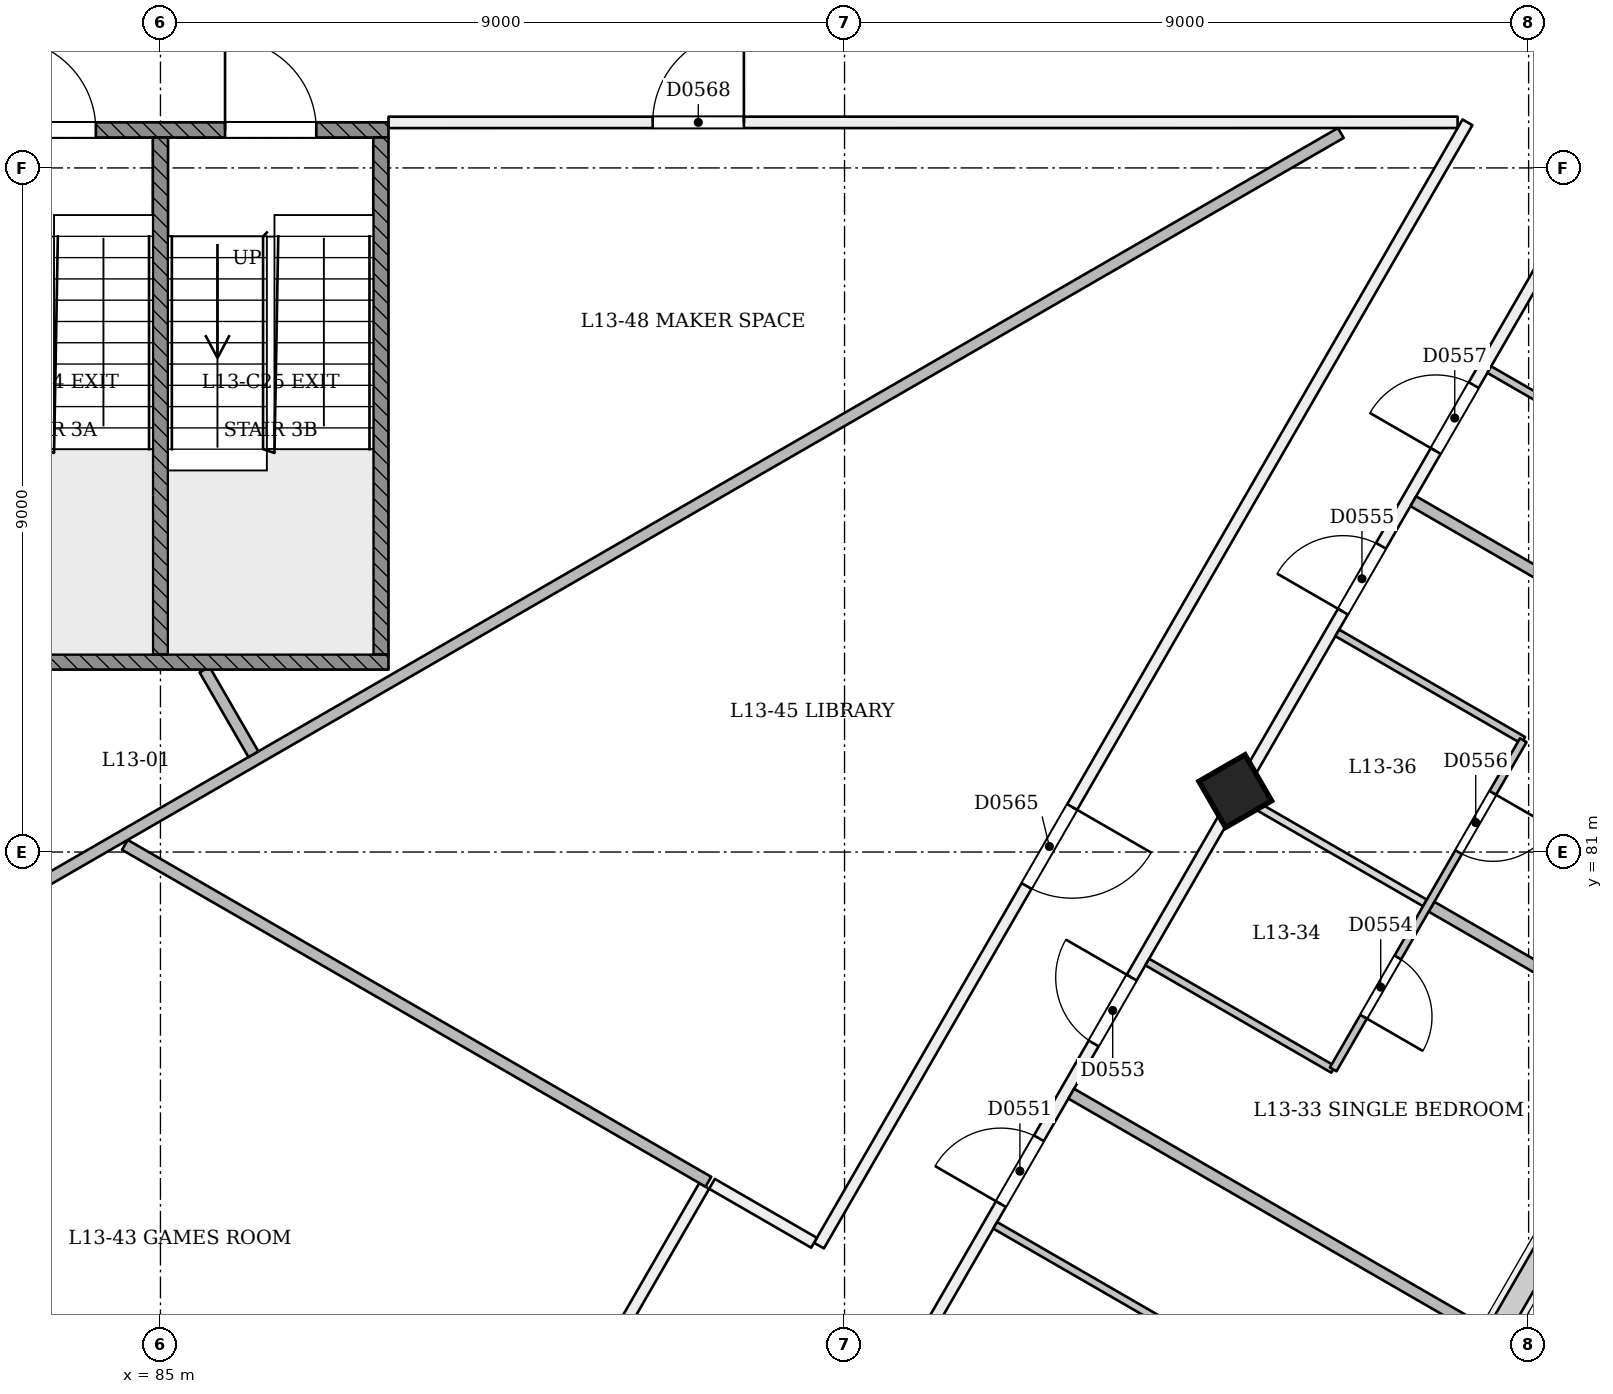
"""IFC4 building model, lengths in metres.
Left out: names, types, materials, properties, quantities, classifications, styles, units other than length and angle.
Written with IfcOpenShell. Run it as: python <this file> out.ifc"""

import sys

from ifc_helpers import new_model, si_unit, direction, frame, frame_2d, origin, origin_2d, place, context, subcontext, project, spatial, rectangle, extrude, element, fill, save


model = new_model("IFC4")
c1 = context("Model", 3, precision=1e-05, world=origin(), true_north=direction((0.0, 1.0)))
c2 = subcontext(c1, "Body", "Model", "MODEL_VIEW")
j1 = project(units=[si_unit("LENGTHUNIT", "METRE"), si_unit("PLANEANGLEUNIT", "RADIAN")], contexts=[c1])
p1 = place(None, origin())
s1 = spatial("IfcSite", under=j1, at=p1, CompositionType="ELEMENT")
p2 = place(p1, origin())
s2 = spatial("IfcBuilding", under=s1, at=p2, CompositionType="ELEMENT")
p3 = place(p2, frame((0.0, 0.0, 55.8)))
s3 = spatial("IfcBuildingStorey", under=s2, at=p3, CompositionType="ELEMENT", Elevation=55.8)
p4 = place(p3, frame((99.168, 81.755, -0.021), z_axis=(-0.022222852987, 0.038483477124, 0.999012095419), x_axis=(-0.500169973044, -0.865642122652, 0.022219665955)))
e1 = element("IfcColumn", 1, at=p4, inside=s3, PredefinedType="COLUMN", context=c2, shape_type="SweptSolid", body=[
    extrude(rectangle(XDim=0.7, YDim=0.7, at=origin_2d()), origin(), (0.0, 0.0, 1.0), 3.604),
])
p5 = place(p3, frame((85.99, 58.932, 0.0), z_axis=(0.0, 0.0, 1.0), x_axis=(0.500001547762, 0.866024510182, 0.0)))
e2 = element("IfcWall", 2, at=p5, inside=s3, PredefinedType="PARTITIONING", context=c2, shape_type="SweptSolid", body=[
    extrude(rectangle(XDim=42.454, YDim=0.15, at=frame_2d((21.227, 0.0))), origin(), (0.0, 0.0, 1.0), 2.7),
])
p6 = place(p5, frame((3.577, 0.0, 0.0)))
e3 = element("IfcOpeningElement", 3, at=p6, cuts=e2, PredefinedType="OPENING", context=c2, shape_type="SweptSolid", body=[
    extrude(rectangle(XDim=1.2, YDim=2.1, at=frame_2d((0.6, 1.05))), frame((0.0, 0.085, 0.0), z_axis=(0.0, -1.0, 0.0), x_axis=(1.0, 0.0, 0.0)), (0.0, 0.0, 1.0), 0.171),
])
p7 = place(p5, frame((11.134, 0.0, 0.0)))
e4 = element("IfcOpeningElement", 4, at=p7, cuts=e2, PredefinedType="OPENING", context=c2, shape_type="SweptSolid", body=[
    extrude(rectangle(XDim=1.0, YDim=2.1, at=frame_2d((0.5, 1.05))), frame((0.0, 0.085, 0.0), z_axis=(0.0, -1.0, 0.0), x_axis=(1.0, 0.0, 0.0)), (0.0, 0.0, 1.0), 0.171),
])
p8 = place(p5, frame((13.575, 0.0, 0.0)))
e5 = element("IfcOpeningElement", 5, at=p8, cuts=e2, PredefinedType="OPENING", context=c2, shape_type="SweptSolid", body=[
    extrude(rectangle(XDim=1.0, YDim=2.1, at=frame_2d((0.5, 1.05))), frame((0.0, 0.085, 0.0), z_axis=(0.0, -1.0, 0.0), x_axis=(1.0, 0.0, 0.0)), (0.0, 0.0, 1.0), 0.171),
])
p9 = place(p5, frame((20.134, 0.0, 0.0)))
e6 = element("IfcOpeningElement", 6, at=p9, cuts=e2, PredefinedType="OPENING", context=c2, shape_type="SweptSolid", body=[
    extrude(rectangle(XDim=1.0, YDim=2.1, at=frame_2d((0.5, 1.05))), frame((0.0, 0.085, 0.0), z_axis=(0.0, -1.0, 0.0), x_axis=(1.0, 0.0, 0.0)), (0.0, 0.0, 1.0), 0.171),
])
p10 = place(p5, frame((22.575, 0.0, 0.0)))
e7 = element("IfcOpeningElement", 7, at=p10, cuts=e2, PredefinedType="OPENING", context=c2, shape_type="SweptSolid", body=[
    extrude(rectangle(XDim=1.0, YDim=2.1, at=frame_2d((0.5, 1.05))), frame((0.0, 0.085, 0.0), z_axis=(0.0, -1.0, 0.0), x_axis=(1.0, 0.0, 0.0)), (0.0, 0.0, 1.0), 0.171),
])
p11 = place(p5, frame((29.134, 0.0, 0.0)))
e8 = element("IfcOpeningElement", 8, at=p11, cuts=e2, PredefinedType="OPENING", context=c2, shape_type="SweptSolid", body=[
    extrude(rectangle(XDim=1.0, YDim=2.1, at=frame_2d((0.5, 1.05))), frame((0.0, 0.085, 0.0), z_axis=(0.0, -1.0, 0.0), x_axis=(1.0, 0.0, 0.0)), (0.0, 0.0, 1.0), 0.171),
])
p12 = place(p5, frame((31.575, 0.0, 0.0)))
e9 = element("IfcOpeningElement", 9, at=p12, cuts=e2, PredefinedType="OPENING", context=c2, shape_type="SweptSolid", body=[
    extrude(rectangle(XDim=1.0, YDim=2.1, at=frame_2d((0.5, 1.05))), frame((0.0, 0.085, 0.0), z_axis=(0.0, -1.0, 0.0), x_axis=(1.0, 0.0, 0.0)), (0.0, 0.0, 1.0), 0.171),
])
p13 = place(p5, frame((38.134, 0.0, 0.0)))
e10 = element("IfcOpeningElement", 10, at=p13, cuts=e2, PredefinedType="OPENING", context=c2, shape_type="SweptSolid", body=[
    extrude(rectangle(XDim=1.0, YDim=2.1, at=frame_2d((0.5, 1.05))), frame((0.0, 0.085, 0.0), z_axis=(0.0, -1.0, 0.0), x_axis=(1.0, 0.0, 0.0)), (0.0, 0.0, 1.0), 0.171),
])
p14 = place(p5, frame((41.161, 0.0, 0.0)))
e11 = element("IfcOpeningElement", 11, at=p14, cuts=e2, PredefinedType="OPENING", context=c2, shape_type="SweptSolid", body=[
    extrude(rectangle(XDim=1.0, YDim=2.1, at=frame_2d((0.5, 1.05))), frame((0.0, 0.085, 0.0), z_axis=(0.0, -1.0, 0.0), x_axis=(1.0, 0.0, 0.0)), (0.0, 0.0, 1.0), 0.171),
])
p15 = place(p3, frame((92.154, 76.607, 0.0), z_axis=(0.0, 0.0, 1.0), x_axis=(-0.499984506476, -0.86603434879, 0.0)))
e12 = element("IfcWall", 12, at=p15, inside=s3, PredefinedType="PARTITIONING", context=c2, shape_type="SweptSolid", body=[
    extrude(rectangle(XDim=7.661, YDim=0.15, at=frame_2d((3.831, 0.0))), origin(), (0.0, 0.0, 1.0), 3.1),
])
p16 = place(p15, frame((3.455, 0.0, 0.0)))
e13 = element("IfcOpeningElement", 13, at=p16, cuts=e12, PredefinedType="OPENING", context=c2, shape_type="SweptSolid", body=[
    extrude(rectangle(XDim=1.2, YDim=2.1, at=frame_2d((0.6, 1.05))), frame((0.0, 0.085, 0.0), z_axis=(0.0, -1.0, 0.0), x_axis=(1.0, 0.0, 0.0)), (0.0, 0.0, 1.0), 0.171),
])
p17 = place(p3, frame((102.195, 90.6, 0.0), z_axis=(0.0, 0.0, 1.0), x_axis=(-0.499999873444, -0.866025476852, 0.0)))
e14 = element("IfcWall", 14, at=p17, inside=s3, PredefinedType="PARTITIONING", context=c2, shape_type="SweptSolid", body=[
    extrude(rectangle(XDim=17.064, YDim=0.15, at=frame_2d((8.532, 0.0))), origin(), (0.0, 0.0, 1.0), 3.1),
])
p18 = place(p17, frame((10.401, 0.0, 0.0)))
e15 = element("IfcOpeningElement", 15, at=p18, cuts=e14, PredefinedType="OPENING", context=c2, shape_type="SweptSolid", body=[
    extrude(rectangle(XDim=1.2, YDim=2.1, at=frame_2d((0.6, 1.05))), frame((0.0, 0.085, 0.0), z_axis=(0.0, -1.0, 0.0), x_axis=(1.0, 0.0, 0.0)), (0.0, 0.0, 1.0), 0.171),
])
p19 = place(p3, frame((93.598, 75.86, 0.0), z_axis=(0.0, 0.0, 1.0), x_axis=(-0.865975732936, 0.500086022567, 0.0)))
e16 = element("IfcWall", 16, at=p19, inside=s3, PredefinedType="PARTITIONING", context=c2, shape_type="SweptSolid", body=[
    extrude(rectangle(XDim=1.55, YDim=0.15, at=frame_2d((0.775, 0.0))), origin(), (0.0, 0.0, 1.0), 3.1),
])
p20 = place(p3, frame((85.0, 60.817, 0.0), z_axis=(0.0, 0.0, 1.0), x_axis=(-0.49999631887, 0.866027529076, 0.0)))
e17 = element("IfcWall", 17, at=p20, inside=s3, PredefinedType="PARTITIONING", context=c2, shape_type="SweptSolid", body=[
    extrude(rectangle(XDim=34.391, YDim=0.15, at=frame_2d((17.195, 0.0))), origin(), (0.0, 0.0, 1.0), 3.1),
])
p21 = place(p20, frame((24.599, 0.0, 0.0)))
e18 = element("IfcOpeningElement", 18, at=p21, cuts=e17, PredefinedType="OPENING", context=c2, shape_type="SweptSolid", body=[
    extrude(rectangle(XDim=1.2, YDim=2.1, at=frame_2d((0.6, 1.05))), frame((0.0, 0.085, 0.0), z_axis=(0.0, -1.0, 0.0), x_axis=(1.0, 0.0, 0.0)), (0.0, 0.0, 1.0), 0.171),
])
p22 = place(p20, frame((7.281, 0.0, 0.0)))
e19 = element("IfcOpeningElement", 19, at=p22, cuts=e17, PredefinedType="OPENING", context=c2, shape_type="SweptSolid", body=[
    extrude(rectangle(XDim=1.2, YDim=2.1, at=frame_2d((0.6, 1.05))), frame((0.0, 0.085, 0.0), z_axis=(0.0, -1.0, 0.0), x_axis=(1.0, 0.0, 0.0)), (0.0, 0.0, 1.0), 0.171),
])
p23 = place(p3, frame((88.0, 90.599, 0.0), z_axis=(0.0, 0.0, 1.0), x_axis=(0.99999999759, 6.942998e-05, 0.0)))
e20 = element("IfcWall", 20, at=p23, inside=s3, PredefinedType="PARTITIONING", context=c2, shape_type="SweptSolid", body=[
    extrude(rectangle(XDim=14.065, YDim=0.15, at=frame_2d((7.033, 0.0))), origin(), (0.0, 0.0, 1.0), 3.1),
])
p24 = place(p23, frame((3.476, 0.0, 0.0)))
e21 = element("IfcOpeningElement", 21, at=p24, cuts=e20, PredefinedType="OPENING", context=c2, shape_type="SweptSolid", body=[
    extrude(rectangle(XDim=1.2, YDim=2.1, at=frame_2d((0.6, 1.05))), frame((0.0, 0.085, 0.0), z_axis=(0.0, -1.0, 0.0), x_axis=(1.0, 0.0, 0.0)), (0.0, 0.0, 1.0), 0.171),
])
p25 = place(p3, frame((95.982, 76.089, 0.0), z_axis=(0.0, 0.0, 1.0), x_axis=(0.866011447264, -0.500024172624, 0.0)))
e22 = element("IfcWall", 22, at=p25, inside=s3, PredefinedType="PARTITIONING", context=c2, shape_type="SweptSolid", body=[
    extrude(rectangle(XDim=2.825, YDim=0.1, at=frame_2d((1.413, 0.0))), origin(), (0.0, 0.0, 1.0), 3.1),
])
p26 = place(p3, frame((102.478, 74.648, 0.0), z_axis=(0.0, 0.0, 1.0), x_axis=(-0.866025401434, 0.500000004071, 0.0)))
e23 = element("IfcWall", 23, at=p26, inside=s3, PredefinedType="PARTITIONING", context=c2, shape_type="SweptSolid", body=[
    extrude(rectangle(XDim=6.345, YDim=0.15, at=frame_2d((3.173, 0.0))), origin(), (0.0, 0.0, 1.0), 2.6),
])
p27 = place(p3, frame((100.429, 78.14, 0.0), z_axis=(0.0, 0.0, 1.0), x_axis=(-0.866011447264, 0.500024172624, 0.0)))
e24 = element("IfcWall", 24, at=p27, inside=s3, PredefinedType="PARTITIONING", context=c2, shape_type="SweptSolid", body=[
    extrude(rectangle(XDim=2.825, YDim=0.1, at=frame_2d((1.413, 0.0))), origin(), (0.0, 0.0, 1.0), 3.1),
])
p28 = place(p3, frame((104.71, 78.555, 0.0), z_axis=(0.0, 0.0, 1.0), x_axis=(-0.866013532718, 0.500020560727, 0.0)))
e25 = element("IfcWall", 25, at=p28, inside=s3, PredefinedType="PARTITIONING", context=c2, shape_type="SweptSolid", body=[
    extrude(rectangle(XDim=3.45, YDim=0.15, at=frame_2d((1.725, 0.0))), origin(), (0.0, 0.0, 1.0), 2.6),
])
p29 = place(p3, frame((101.636, 80.331, 0.0), z_axis=(0.0, 0.0, 1.0), x_axis=(-0.866042014628, 0.499971228071, 0.0)))
e26 = element("IfcWall", 26, at=p29, inside=s3, PredefinedType="PARTITIONING", context=c2, shape_type="SweptSolid", body=[
    extrude(rectangle(XDim=2.775, YDim=0.1, at=frame_2d((1.388, 0.0))), origin(), (0.0, 0.0, 1.0), 2.7),
])
p30 = place(p3, frame((100.482, 83.883, 0.0), z_axis=(0.0, 0.0, 1.0), x_axis=(0.866011447264, -0.500024172624, 0.0)))
e27 = element("IfcWall", 27, at=p30, inside=s3, PredefinedType="PARTITIONING", context=c2, shape_type="SweptSolid", body=[
    extrude(rectangle(XDim=2.825, YDim=0.1, at=frame_2d((1.413, 0.0))), origin(), (0.0, 0.0, 1.0), 3.1),
])
p31 = place(p3, frame((102.929, 82.47, 0.0), z_axis=(0.0, 0.0, 1.0), x_axis=(-0.500004234368, -0.866022959057, 0.0)))
e28 = element("IfcWall", 28, at=p31, inside=s3, PredefinedType="PARTITIONING", context=c2, shape_type="SweptSolid", body=[
    extrude(rectangle(XDim=5.0, YDim=0.1, at=frame_2d((2.5, 0.0))), origin(), (0.0, 0.0, 1.0), 2.7),
])
p32 = place(p31, frame((3.3, 0.0, 0.0)))
e29 = element("IfcOpeningElement", 29, at=p32, cuts=e28, PredefinedType="OPENING", context=c2, shape_type="SweptSolid", body=[
    extrude(rectangle(XDim=0.9, YDim=2.1, at=frame_2d((0.45, 1.05))), frame((0.0, 0.061, 0.0), z_axis=(0.0, -1.0, 0.0), x_axis=(1.0, 0.0, 0.0)), (0.0, 0.0, 1.0), 0.121),
])
p33 = place(p31, frame((0.8, 0.0, 0.0)))
e30 = element("IfcOpeningElement", 30, at=p33, cuts=e28, PredefinedType="OPENING", context=c2, shape_type="SweptSolid", body=[
    extrude(rectangle(XDim=0.9, YDim=2.1, at=frame_2d((0.45, 1.05))), frame((0.0, 0.061, 0.0), z_axis=(0.0, -1.0, 0.0), x_axis=(1.0, 0.0, 0.0)), (0.0, 0.0, 1.0), 0.121),
])
p34 = place(p3, frame((106.978, 82.442, 0.0), z_axis=(0.0, 0.0, 1.0), x_axis=(-0.866025401434, 0.500000004071, 0.0)))
e31 = element("IfcWall", 31, at=p34, inside=s3, PredefinedType="PARTITIONING", context=c2, shape_type="SweptSolid", body=[
    extrude(rectangle(XDim=6.345, YDim=0.15, at=frame_2d((3.173, 0.0))), origin(), (0.0, 0.0, 1.0), 2.6),
])
p35 = place(p3, frame((104.929, 85.935, 0.0), z_axis=(0.0, 0.0, 1.0), x_axis=(-0.866011447264, 0.500024172624, 0.0)))
e32 = element("IfcWall", 32, at=p35, inside=s3, PredefinedType="PARTITIONING", context=c2, shape_type="SweptSolid", body=[
    extrude(rectangle(XDim=2.825, YDim=0.1, at=frame_2d((1.413, 0.0))), origin(), (0.0, 0.0, 1.0), 3.1),
])
p36 = place(p3, frame((92.208, 76.662, 0.0), z_axis=(0.0, 0.0, 1.0), x_axis=(-0.8660209256, 0.500007756363, 0.0)))
e33 = element("IfcWall", 33, at=p36, inside=s3, PredefinedType="PARTITIONING", context=c2, shape_type="SweptSolid", body=[
    extrude(rectangle(XDim=8.864, YDim=0.15, at=frame_2d((4.432, 0.0))), origin(), (0.0, 0.0, 1.0), 3.1),
])
p37 = place(p3, frame((78.395, 75.618, 0.0), z_axis=(0.0, 0.0, 1.0), x_axis=(0.866027097721, -0.499997066004, 0.0)))
e34 = element("IfcWall", 34, at=p37, inside=s3, PredefinedType="PARTITIONING", context=c2, shape_type="SweptSolid", body=[
    extrude(rectangle(XDim=11.441, YDim=0.15, at=frame_2d((5.72, 0.0))), origin(), (0.0, 0.0, 1.0), 3.1),
])
p38 = place(p3, frame((100.529, 90.46, 0.0), z_axis=(0.0, 0.0, 1.0), x_axis=(-0.866026416576, -0.499998245789, 0.0)))
e35 = element("IfcWall", 35, at=p38, inside=s3, PredefinedType="PARTITIONING", context=c2, shape_type="SweptSolid", body=[
    extrude(rectangle(XDim=26.59, YDim=0.15, at=frame_2d((13.295, 0.0))), origin(), (0.0, 0.0, 1.0), 3.1),
])
p39 = place(p3, frame((85.58, 83.4, 0.0), z_axis=(0.0, 0.0, 1.0), x_axis=(0.500122526358, -0.865954651601, 0.0)))
e36 = element("IfcWall", 36, at=p39, inside=s3, PredefinedType="PARTITIONING", context=c2, shape_type="SweptSolid", body=[
    extrude(rectangle(XDim=1.285, YDim=0.15, at=frame_2d((0.643, 0.0))), origin(), (0.0, 0.0, 1.0), 3.1),
])
p40 = place(p3, frame((82.0, 90.5, 0.0), z_axis=(0.0, 0.0, 1.0), x_axis=(1.0, 0.0, 0.0)))
e37 = element("IfcWall", 37, at=p40, inside=s3, PredefinedType="SOLIDWALL", context=c2, shape_type="SweptSolid", body=[
    extrude(rectangle(XDim=6.0, YDim=0.2, at=frame_2d((3.0, 0.0))), origin(), (0.0, 0.0, 1.0), 3.1),
])
p41 = place(p40, frame((0.95, 0.0, 0.0)))
e38 = element("IfcOpeningElement", 38, at=p41, cuts=e37, PredefinedType="OPENING", context=c2, shape_type="SweptSolid", body=[
    extrude(rectangle(XDim=1.2, YDim=2.1, at=frame_2d((0.6, 1.05))), frame((0.0, 0.11, 0.0), z_axis=(0.0, -1.0, 0.0), x_axis=(1.0, 0.0, 0.0)), (0.0, 0.0, 1.0), 0.221),
])
p42 = place(p40, frame((3.85, 0.0, 0.0)))
e39 = element("IfcOpeningElement", 39, at=p42, cuts=e37, PredefinedType="OPENING", context=c2, shape_type="SweptSolid", body=[
    extrude(rectangle(XDim=1.2, YDim=2.1, at=frame_2d((0.6, 1.05))), frame((0.0, 0.11, 0.0), z_axis=(0.0, -1.0, 0.0), x_axis=(1.0, 0.0, 0.0)), (0.0, 0.0, 1.0), 0.221),
])
p43 = place(p3, frame((82.0, 83.5, 0.0), z_axis=(0.0, 0.0, 1.0), x_axis=(1.0, 0.0, 0.0)))
e40 = element("IfcWall", 40, at=p43, inside=s3, PredefinedType="SOLIDWALL", context=c2, shape_type="SweptSolid", body=[
    extrude(rectangle(XDim=6.0, YDim=0.2, at=frame_2d((3.0, 0.0))), origin(), (0.0, 0.0, 1.0), 3.1),
])
for number, where, z_axis, x_axis in (
    (41, (87.9, 83.6, 0.0), (0.0, 0.0, 1.0), (0.0, 1.0, 0.0)),
    (42, (85.0, 83.6, 0.0), (0.0, 0.0, 1.0), (0.0, 1.0, 0.0)),
):
    element("IfcWall", number, at=place(p3, frame(where, z_axis=z_axis, x_axis=x_axis)), inside=s3, PredefinedType="SOLIDWALL", context=c2, shape_type="SweptSolid", body=[
        extrude(rectangle(XDim=6.8, YDim=0.2, at=frame_2d((3.4, 0.0))), origin(), (0.0, 0.0, 1.0), 3.1),
    ])
p44 = place(p9, origin())
e43 = element("IfcDoor", 43, at=p44, inside=s3, OperationType="SINGLE_SWING_LEFT", PredefinedType="NOTDEFINED", context=c2, shape_type="SweptSolid", body=[
    extrude(rectangle(XDim=1.0, YDim=2.1, at=frame_2d((0.5, 1.05))), frame((0.0, 0.025, 0.0), z_axis=(0.0, -1.0, 0.0), x_axis=(1.0, 0.0, 0.0)), (0.0, 0.0, 1.0), 0.05),
])
fill(e6, e43)
p45 = place(p10, origin())
e44 = element("IfcDoor", 44, at=p45, inside=s3, OperationType="SINGLE_SWING_RIGHT", PredefinedType="NOTDEFINED", context=c2, shape_type="SweptSolid", body=[
    extrude(rectangle(XDim=1.0, YDim=2.1, at=frame_2d((0.5, 1.05))), frame((0.0, 0.025, 0.0), z_axis=(0.0, -1.0, 0.0), x_axis=(1.0, 0.0, 0.0)), (0.0, 0.0, 1.0), 0.05),
])
fill(e7, e44)
p46 = place(p32, origin())
e45 = element("IfcDoor", 45, at=p46, inside=s3, OperationType="SINGLE_SWING_RIGHT", PredefinedType="NOTDEFINED", context=c2, shape_type="SweptSolid", body=[
    extrude(rectangle(XDim=0.9, YDim=2.1, at=frame_2d((0.45, 1.05))), frame((0.0, 0.025, 0.0), z_axis=(0.0, -1.0, 0.0), x_axis=(1.0, 0.0, 0.0)), (0.0, 0.0, 1.0), 0.05),
])
fill(e29, e45)
p47 = place(p11, origin())
e46 = element("IfcDoor", 46, at=p47, inside=s3, OperationType="SINGLE_SWING_LEFT", PredefinedType="NOTDEFINED", context=c2, shape_type="SweptSolid", body=[
    extrude(rectangle(XDim=1.0, YDim=2.1, at=frame_2d((0.5, 1.05))), frame((0.0, 0.025, 0.0), z_axis=(0.0, -1.0, 0.0), x_axis=(1.0, 0.0, 0.0)), (0.0, 0.0, 1.0), 0.05),
])
fill(e8, e46)
p48 = place(p33, origin())
e47 = element("IfcDoor", 47, at=p48, inside=s3, OperationType="SINGLE_SWING_LEFT", PredefinedType="NOTDEFINED", context=c2, shape_type="SweptSolid", body=[
    extrude(rectangle(XDim=0.9, YDim=2.1, at=frame_2d((0.45, 1.05))), frame((0.0, 0.025, 0.0), z_axis=(0.0, -1.0, 0.0), x_axis=(1.0, 0.0, 0.0)), (0.0, 0.0, 1.0), 0.05),
])
fill(e30, e47)
p49 = place(p12, origin())
e48 = element("IfcDoor", 48, at=p49, inside=s3, OperationType="SINGLE_SWING_LEFT", PredefinedType="NOTDEFINED", context=c2, shape_type="SweptSolid", body=[
    extrude(rectangle(XDim=1.0, YDim=2.1, at=frame_2d((0.5, 1.05))), frame((0.0, 0.025, 0.0), z_axis=(0.0, -1.0, 0.0), x_axis=(1.0, 0.0, 0.0)), (0.0, 0.0, 1.0), 0.05),
])
fill(e9, e48)
p50 = place(p18, origin())
e49 = element("IfcDoor", 49, at=p50, inside=s3, OperationType="SINGLE_SWING_LEFT", PredefinedType="NOTDEFINED", context=c2, shape_type="SweptSolid", body=[
    extrude(rectangle(XDim=1.2, YDim=2.1, at=frame_2d((0.6, 1.05))), frame((0.0, 0.025, 0.0), z_axis=(0.0, -1.0, 0.0), x_axis=(1.0, 0.0, 0.0)), (0.0, 0.0, 1.0), 0.05),
])
fill(e15, e49)
p51 = place(p24, origin())
e50 = element("IfcDoor", 50, at=p51, inside=s3, OperationType="SINGLE_SWING_RIGHT", PredefinedType="NOTDEFINED", context=c2, shape_type="SweptSolid", body=[
    extrude(rectangle(XDim=1.2, YDim=2.1, at=frame_2d((0.6, 1.05))), frame((0.0, 0.025, 0.0), z_axis=(0.0, -1.0, 0.0), x_axis=(1.0, 0.0, 0.0)), (0.0, 0.0, 1.0), 0.05),
])
fill(e21, e50)
p52 = place(p41, origin())
e51 = element("IfcDoor", 51, at=p52, inside=s3, OperationType="SINGLE_SWING_LEFT", PredefinedType="NOTDEFINED", context=c2, shape_type="SweptSolid", body=[
    extrude(rectangle(XDim=1.2, YDim=2.1, at=frame_2d((0.6, 1.05))), frame((0.0, 0.025, 0.0), z_axis=(0.0, -1.0, 0.0), x_axis=(1.0, 0.0, 0.0)), (0.0, 0.0, 1.0), 0.05),
])
fill(e38, e51)
p53 = place(p42, origin())
e52 = element("IfcDoor", 52, at=p53, inside=s3, OperationType="SINGLE_SWING_LEFT", PredefinedType="NOTDEFINED", context=c2, shape_type="SweptSolid", body=[
    extrude(rectangle(XDim=1.2, YDim=2.1, at=frame_2d((0.6, 1.05))), frame((0.0, 0.025, 0.0), z_axis=(0.0, -1.0, 0.0), x_axis=(1.0, 0.0, 0.0)), (0.0, 0.0, 1.0), 0.05),
])
fill(e39, e52)
save(model, sys.argv[1])
